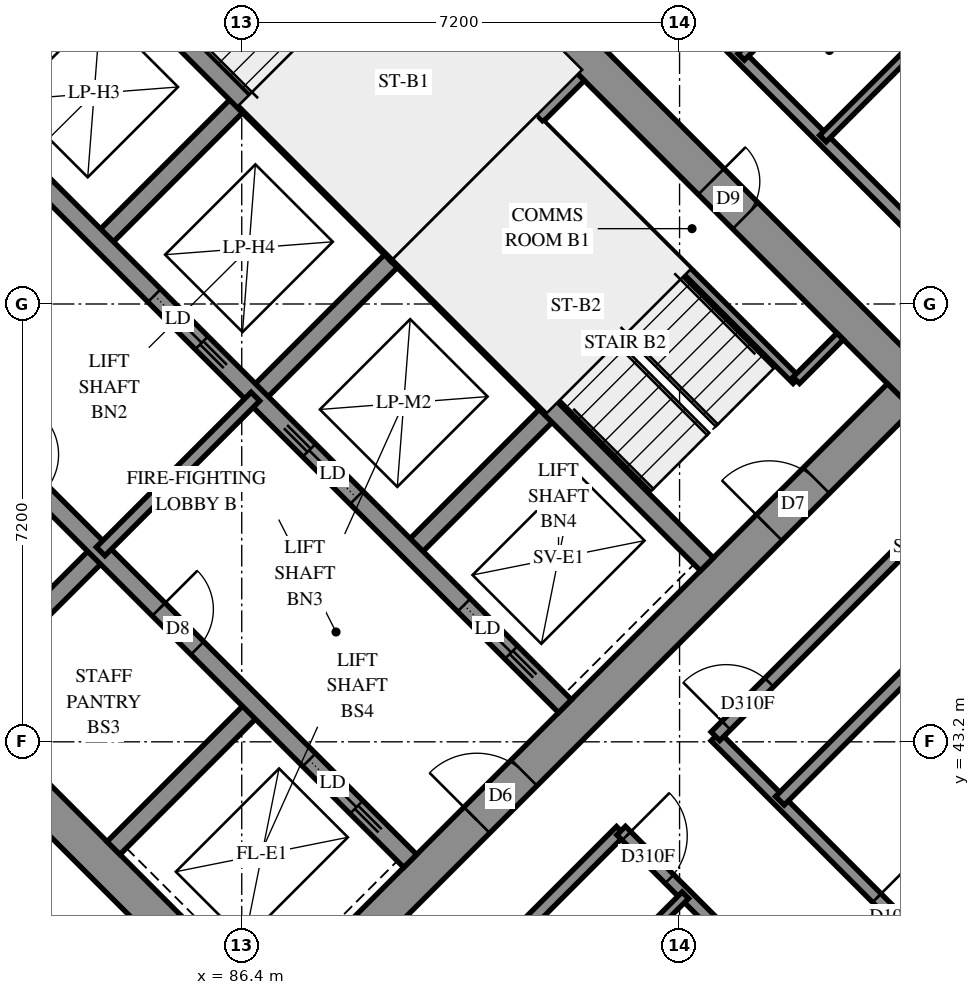
"""IFC4 building model, lengths in metres.
Left out: names, types, materials, properties, quantities, classifications, styles, units other than length and angle.
Written with IfcOpenShell. Run it as: python <this file> out.ifc"""

import sys

from ifc_helpers import new_model, si_unit, direction, frame, frame_2d, origin, place, context, subcontext, project, spatial, polyline, rectangle, outline, extrude, element, fill, save


model = new_model("IFC4")
c1 = context("Model", 3, precision=1e-05, world=origin(), true_north=direction((0.0, 1.0)))
c2 = subcontext(c1, "Body", "Model", "MODEL_VIEW")
j1 = project(units=[si_unit("LENGTHUNIT", "METRE"), si_unit("PLANEANGLEUNIT", "RADIAN")], contexts=[c1])
p1 = place(None, origin())
s1 = spatial("IfcSite", under=j1, at=p1, CompositionType="ELEMENT")
p2 = place(p1, origin())
s2 = spatial("IfcBuilding", under=s1, at=p2, CompositionType="ELEMENT")
p3 = place(p2, frame((0.0, 0.0, 145.6)))
s3 = spatial("IfcBuildingStorey", under=s2, at=p3, CompositionType="ELEMENT", Elevation=145.6)
p4 = place(p3, frame((76.018, 49.302, -0.3), z_axis=(0.0, 0.0, 1.0), x_axis=(0.7071067812, -0.7071067812, 0.0)))
e1 = element("IfcWall", 1, at=p4, inside=s3, PredefinedType="SHEAR", context=c2, shape_type="SweptSolid", body=[
    extrude(rectangle(XDim=15.6, YDim=0.6, at=frame_2d((7.8, 0.0))), origin(), (0.0, 0.0, 1.0), 2.7),
])
p5 = place(p3, frame((86.625, 59.908, -0.3), z_axis=(0.0, 0.0, 1.0), x_axis=(0.7071067812, -0.7071067812, 0.0)))
e2 = element("IfcWall", 2, at=p5, inside=s3, PredefinedType="SHEAR", context=c2, shape_type="SweptSolid", body=[
    extrude(rectangle(XDim=15.6, YDim=0.6, at=frame_2d((7.8, 0.0))), origin(), (0.0, 0.0, 1.0), 2.7),
])
p6 = place(p5, frame((10.6, 0.0, 0.3)))
e3 = element("IfcOpeningElement", 3, at=p6, cuts=e2, PredefinedType="OPENING", context=c2, shape_type="SweptSolid", body=[
    extrude(rectangle(XDim=0.8, YDim=2.1, at=frame_2d((0.4, 1.05))), frame((0.0, 0.31, 0.0), z_axis=(0.0, -1.0, 0.0), x_axis=(1.0, 0.0, 0.0)), (0.0, 0.0, 1.0), 0.62),
])
p7 = place(p3, frame((76.442, 49.302, -0.3), z_axis=(0.0, 0.0, 1.0), x_axis=(0.7071067812, 0.7071067812, 0.0)))
e4 = element("IfcWall", 4, at=p7, inside=s3, PredefinedType="SHEAR", context=c2, shape_type="SweptSolid", body=[
    extrude(rectangle(XDim=14.4, YDim=0.6, at=frame_2d((7.2, 0.0))), origin(), (0.0, 0.0, 1.0), 2.7),
])
p8 = place(p7, frame((4.55, 0.0, 0.3)))
e5 = element("IfcOpeningElement", 5, at=p8, cuts=e4, PredefinedType="OPENING", context=c2, shape_type="SweptSolid", body=[
    extrude(rectangle(XDim=1.1, YDim=2.1, at=frame_2d((0.55, 1.05))), frame((0.0, 0.31, 0.0), z_axis=(0.0, -1.0, 0.0), x_axis=(1.0, 0.0, 0.0)), (0.0, 0.0, 1.0), 0.62),
])
p9 = place(p7, frame((11.35, 0.0, 0.3)))
e6 = element("IfcOpeningElement", 6, at=p9, cuts=e4, PredefinedType="OPENING", context=c2, shape_type="SweptSolid", body=[
    extrude(rectangle(XDim=1.1, YDim=2.1, at=frame_2d((0.55, 1.05))), frame((0.0, 0.31, 0.0), z_axis=(0.0, -1.0, 0.0), x_axis=(1.0, 0.0, 0.0)), (0.0, 0.0, 1.0), 0.62),
])
p10 = place(p3, frame((87.049, 38.695, -0.3), z_axis=(0.0, 0.0, 1.0), x_axis=(0.7071067812, 0.7071067812, 0.0)))
e7 = element("IfcWall", 7, at=p10, inside=s3, PredefinedType="SHEAR", context=c2, shape_type="SweptSolid", body=[
    extrude(rectangle(XDim=14.4, YDim=0.6, at=frame_2d((7.2, 0.0))), origin(), (0.0, 0.0, 1.0), 2.7),
])
p11 = place(p10, frame((4.55, 0.0, 0.3)))
e8 = element("IfcOpeningElement", 8, at=p11, cuts=e7, PredefinedType="OPENING", context=c2, shape_type="SweptSolid", body=[
    extrude(rectangle(XDim=1.1, YDim=2.1, at=frame_2d((0.55, 1.05))), frame((0.0, 0.31, 0.0), z_axis=(0.0, -1.0, 0.0), x_axis=(1.0, 0.0, 0.0)), (0.0, 0.0, 1.0), 0.62),
])
p12 = place(p10, frame((11.35, 0.0, 0.3)))
e9 = element("IfcOpeningElement", 9, at=p12, cuts=e7, PredefinedType="OPENING", context=c2, shape_type="SweptSolid", body=[
    extrude(rectangle(XDim=1.1, YDim=2.1, at=frame_2d((0.55, 1.05))), frame((0.0, 0.31, 0.0), z_axis=(0.0, -1.0, 0.0), x_axis=(1.0, 0.0, 0.0)), (0.0, 0.0, 1.0), 0.62),
])
p13 = place(p3, frame((84.079, 51.423, 0.0), z_axis=(0.0, 0.0, 1.0), x_axis=(0.7071219326, 0.7070916295, 0.0)))
e10 = element("IfcWall", 10, at=p13, inside=s3, PredefinedType="SOLIDWALL", context=c2, shape_type="SweptSolid", body=[
    extrude(rectangle(XDim=3.3, YDim=0.3, at=frame_2d((1.65, 0.0))), origin(), (0.0, 0.0, 1.0), 3.1),
])
p14 = place(p3, frame((81.746, 43.999, 0.0), z_axis=(0.0, 0.0, 1.0), x_axis=(0.7071067812, 0.7071067812, 0.0)))
e11 = element("IfcWall", 11, at=p14, inside=s3, PredefinedType="SOLIDWALL", context=c2, shape_type="SweptSolid", body=[
    extrude(rectangle(XDim=3.3, YDim=0.3, at=frame_2d((1.65, 0.0))), origin(), (0.0, 0.0, 1.0), 3.1),
])
p15 = place(p3, frame((86.625, 48.878, 0.0), z_axis=(0.0, 0.0, 1.0), x_axis=(0.7071067812, 0.7071067812, 0.0)))
e12 = element("IfcWall", 12, at=p15, inside=s3, PredefinedType="SOLIDWALL", context=c2, shape_type="SweptSolid", body=[
    extrude(rectangle(XDim=3.3, YDim=0.3, at=frame_2d((1.65, 0.0))), origin(), (0.0, 0.0, 1.0), 3.1),
])
p16 = place(p3, frame((84.291, 41.453, 0.0), z_axis=(0.0, 0.0, 1.0), x_axis=(0.7071067812, 0.7071067812, 0.0)))
e13 = element("IfcWall", 13, at=p16, inside=s3, PredefinedType="SOLIDWALL", context=c2, shape_type="SweptSolid", body=[
    extrude(rectangle(XDim=3.3, YDim=0.3, at=frame_2d((1.65, 0.0))), origin(), (0.0, 0.0, 1.0), 3.1),
])
p17 = place(p3, frame((89.17, 46.332, 0.0), z_axis=(0.0, 0.0, 1.0), x_axis=(0.7071067812, 0.7071067812, 0.0)))
e14 = element("IfcWall", 14, at=p17, inside=s3, PredefinedType="SOLIDWALL", context=c2, shape_type="SweptSolid", body=[
    extrude(rectangle(XDim=3.3, YDim=0.3, at=frame_2d((1.65, 0.0))), origin(), (0.0, 0.0, 1.0), 3.1),
])
p18 = place(p3, frame((78.988, 51.423, 0.0), z_axis=(0.0, 0.0, 1.0), x_axis=(0.7071067812, -0.7071067812, 0.0)))
e15 = element("IfcWall", 15, at=p18, inside=s3, PredefinedType="SOLIDWALL", context=c2, shape_type="SweptSolid", body=[
    extrude(rectangle(XDim=14.4, YDim=0.3, at=frame_2d((7.2, 0.0))), origin(), (0.0, 0.0, 1.0), 3.1),
])
p19 = place(p18, frame((1.35, 0.0, 0.0)))
e16 = element("IfcOpeningElement", 16, at=p19, cuts=e15, PredefinedType="OPENING", context=c2, shape_type="SweptSolid", body=[
    extrude(rectangle(XDim=0.9, YDim=2.1, at=frame_2d((0.45, 1.05))), frame((0.0, 0.16, 0.0), z_axis=(0.0, -1.0, 0.0), x_axis=(1.0, 0.0, 0.0)), (0.0, 0.0, 1.0), 0.32),
])
p20 = place(p18, frame((4.95, 0.0, 0.0)))
e17 = element("IfcOpeningElement", 17, at=p20, cuts=e15, PredefinedType="OPENING", context=c2, shape_type="SweptSolid", body=[
    extrude(rectangle(XDim=0.9, YDim=2.1, at=frame_2d((0.45, 1.05))), frame((0.0, 0.16, 0.0), z_axis=(0.0, -1.0, 0.0), x_axis=(1.0, 0.0, 0.0)), (0.0, 0.0, 1.0), 0.32),
])
p21 = place(p18, frame((8.55, 0.0, 0.0)))
e18 = element("IfcOpeningElement", 18, at=p21, cuts=e15, PredefinedType="OPENING", context=c2, shape_type="SweptSolid", body=[
    extrude(rectangle(XDim=0.9, YDim=2.1, at=frame_2d((0.45, 1.05))), frame((0.0, 0.16, 0.0), z_axis=(0.0, -1.0, 0.0), x_axis=(1.0, 0.0, 0.0)), (0.0, 0.0, 1.0), 0.32),
])
p22 = place(p18, frame((12.05, 0.0, 0.0)))
e19 = element("IfcOpeningElement", 19, at=p22, cuts=e15, PredefinedType="OPENING", context=c2, shape_type="SweptSolid", body=[
    extrude(rectangle(XDim=1.1, YDim=2.1, at=frame_2d((0.55, 1.05))), frame((0.0, 0.16, 0.0), z_axis=(0.0, -1.0, 0.0), x_axis=(1.0, 0.0, 0.0)), (0.0, 0.0, 1.0), 0.32),
])
p23 = place(p3, frame((81.534, 53.969, 0.0), z_axis=(0.0, 0.0, 1.0), x_axis=(0.707103309, -0.7071102534, 0.0)))
e20 = element("IfcWall", 20, at=p23, inside=s3, PredefinedType="SOLIDWALL", context=c2, shape_type="SweptSolid", body=[
    extrude(rectangle(XDim=14.4, YDim=0.3, at=frame_2d((7.2, 0.0))), origin(), (0.0, 0.0, 1.0), 3.1),
])
p24 = place(p23, frame((1.25, 0.0, 0.0)))
e21 = element("IfcOpeningElement", 21, at=p24, cuts=e20, PredefinedType="OPENING", context=c2, shape_type="SweptSolid", body=[
    extrude(rectangle(XDim=1.1, YDim=2.1, at=frame_2d((0.55, 1.05))), frame((0.0, 0.16, 0.0), z_axis=(0.0, -1.0, 0.0), x_axis=(1.0, 0.0, 0.0)), (0.0, 0.0, 1.0), 0.32),
])
p25 = place(p23, frame((4.85, 0.0, 0.0)))
e22 = element("IfcOpeningElement", 22, at=p25, cuts=e20, PredefinedType="OPENING", context=c2, shape_type="SweptSolid", body=[
    extrude(rectangle(XDim=1.1, YDim=2.1, at=frame_2d((0.55, 1.05))), frame((0.0, 0.16, 0.0), z_axis=(0.0, -1.0, 0.0), x_axis=(1.0, 0.0, 0.0)), (0.0, 0.0, 1.0), 0.32),
])
p26 = place(p23, frame((8.45, 0.0, 0.0)))
e23 = element("IfcOpeningElement", 23, at=p26, cuts=e20, PredefinedType="OPENING", context=c2, shape_type="SweptSolid", body=[
    extrude(rectangle(XDim=1.1, YDim=2.1, at=frame_2d((0.55, 1.05))), frame((0.0, 0.16, 0.0), z_axis=(0.0, -1.0, 0.0), x_axis=(1.0, 0.0, 0.0)), (0.0, 0.0, 1.0), 0.32),
])
p27 = place(p23, frame((12.05, 0.0, 0.0)))
e24 = element("IfcOpeningElement", 24, at=p27, cuts=e20, PredefinedType="OPENING", context=c2, shape_type="SweptSolid", body=[
    extrude(rectangle(XDim=1.1, YDim=2.1, at=frame_2d((0.55, 1.05))), frame((0.0, 0.16, 0.0), z_axis=(0.0, -1.0, 0.0), x_axis=(1.0, 0.0, 0.0)), (0.0, 0.0, 1.0), 0.32),
])
for number, where, z_axis, x_axis in (
    (25, (83.867, 56.302, 0.0), (0.0, 0.0, 1.0), (0.707, -0.707, 0.0)),
    (26, (88.958, 51.211, 0.0), (0.0, 0.0, 1.0), (0.707, -0.707, 0.0)),
):
    element("IfcWall", number, at=place(p3, frame(where, z_axis=z_axis, x_axis=x_axis)), inside=s3, PredefinedType="SOLIDWALL", context=c2, shape_type="SweptSolid", body=[
        extrude(rectangle(XDim=7.2, YDim=0.3, at=frame_2d((3.6, 0.0))), origin(), (0.0, 0.0, 1.0), 3.1),
    ])
p28 = place(p3, frame((88.958, 51.211, 0.0), z_axis=(0.0, 0.0, 1.0), x_axis=(0.7071067812, 0.7071067812, 0.0)))
e27 = element("IfcWall", 27, at=p28, inside=s3, PredefinedType="SOLIDWALL", context=c2, shape_type="SweptSolid", body=[
    extrude(rectangle(XDim=4.2, YDim=0.3, at=frame_2d((2.1, 0.0))), origin(), (0.0, 0.0, 1.0), 3.1),
])
p29 = place(p3, frame((98.601, 54.493, 0.0), z_axis=(0.0, 0.0, 1.0), x_axis=(-0.7837629032, 0.6210601514, 0.0)))
e28 = element("IfcWall", 28, at=p29, inside=s3, PredefinedType="SOLIDWALL", context=c2, shape_type="SweptSolid", body=[
    extrude(outline(polyline([(-0.029, -0.25), (3.369, -0.25), (3.427, 0.25), (0.029, 0.25), (-0.029, -0.25)])), origin(), (0.0, 0.0, 1.0), 3.1),
])
p30 = place(p29, frame((1.401, 0.0, 0.45)))
e29 = element("IfcOpeningElement", 29, at=p30, cuts=e28, PredefinedType="OPENING", context=c2, shape_type="SweptSolid", body=[
    extrude(rectangle(XDim=1.2, YDim=2.5, at=frame_2d((0.6, 1.25))), frame((0.0, 0.26, 0.0), z_axis=(0.0, -1.0, 0.0), x_axis=(1.0, 0.0, 0.0)), (0.0, 0.0, 1.0), 0.52),
])
p31 = place(p3, frame((91.313, 53.354, 0.0), z_axis=(0.0, 0.0, 1.0), x_axis=(0.7071067812, -0.7071067812, 0.0)))
e30 = element("IfcWall", 30, at=p31, inside=s3, PredefinedType="PARTITIONING", context=c2, shape_type="SweptSolid", body=[
    extrude(rectangle(XDim=5.95, YDim=0.15, at=frame_2d((2.975, 0.0))), origin(), (0.0, 0.0, 1.0), 3.1),
])
p32 = place(p3, frame((95.52, 49.146, 0.0), z_axis=(0.0, 0.0, 1.0), x_axis=(0.7071067812, 0.7071067812, 0.0)))
e31 = element("IfcWall", 31, at=p32, inside=s3, PredefinedType="PARTITIONING", context=c2, shape_type="SweptSolid", body=[
    extrude(rectangle(XDim=1.02, YDim=0.15, at=frame_2d((0.51, 0.0))), origin(), (0.0, 0.0, 1.0), 3.1),
])
p33 = place(p3, frame((84.079, 46.332, 0.0), z_axis=(0.0, 0.0, 1.0), x_axis=(0.7071067812, 0.7071067812, 0.0)))
e32 = element("IfcWall", 32, at=p33, inside=s3, PredefinedType="PARTITIONING", context=c2, shape_type="SweptSolid", body=[
    extrude(rectangle(XDim=3.6, YDim=0.2, at=frame_2d((1.8, 0.0))), origin(), (0.0, 0.0, 1.0), 3.1),
])
p34 = place(p3, frame((94.189, 43.287, 0.0), z_axis=(0.0, 0.0, 1.0), x_axis=(0.7071067812, -0.7071067812, 0.0)))
e33 = element("IfcWall", 33, at=p34, inside=s3, PredefinedType="PARTITIONING", context=c2, shape_type="SweptSolid", body=[
    extrude(rectangle(XDim=12.298, YDim=0.2, at=frame_2d((6.149, 0.0))), origin(), (0.0, 0.0, 1.0), 3.1),
])
p35 = place(p34, frame((3.755, 0.0, 0.0)))
e34 = element("IfcOpeningElement", 34, at=p35, cuts=e33, PredefinedType="OPENING", context=c2, shape_type="SweptSolid", body=[
    extrude(rectangle(XDim=0.9, YDim=2.1, at=frame_2d((0.45, 1.05))), frame((0.0, 0.11, 0.0), z_axis=(0.0, -1.0, 0.0), x_axis=(1.0, 0.0, 0.0)), (0.0, 0.0, 1.0), 0.22),
])
p36 = place(p34, frame((10.998, 0.0, 0.0)))
e35 = element("IfcOpeningElement", 35, at=p36, cuts=e33, PredefinedType="OPENING", context=c2, shape_type="SweptSolid", body=[
    extrude(rectangle(XDim=0.9, YDim=2.1, at=frame_2d((0.45, 1.05))), frame((0.0, 0.11, 0.0), z_axis=(0.0, -1.0, 0.0), x_axis=(1.0, 0.0, 0.0)), (0.0, 0.0, 1.0), 0.22),
])
p37 = place(p3, frame((91.755, 57.317, 0.0), z_axis=(0.0, 0.0, 1.0), x_axis=(0.7071067812, -0.7071067812, 0.0)))
e36 = element("IfcWall", 36, at=p37, inside=s3, PredefinedType="PARTITIONING", context=c2, shape_type="SweptSolid", body=[
    extrude(rectangle(XDim=11.639, YDim=0.2, at=frame_2d((5.819, 0.0))), origin(), (0.0, 0.0, 1.0), 3.1),
])
p38 = place(p3, frame((95.25, 42.232, 0.0), z_axis=(0.0, 0.0, 1.0), x_axis=(0.7071114386, 0.7071021238, 0.0)))
e37 = element("IfcWall", 37, at=p38, inside=s3, PredefinedType="PARTITIONING", context=c2, shape_type="SweptSolid", body=[
    extrude(rectangle(XDim=10.736, YDim=0.2, at=frame_2d((5.368, 0.0))), origin(), (0.0, 0.0, 1.0), 3.1),
])
p39 = place(p3, frame((80.899, 41.869, 0.0), z_axis=(0.0, 0.0, 1.0), x_axis=(0.7071067812, -0.7071067812, 0.0)))
e38 = element("IfcWall", 38, at=p39, inside=s3, PredefinedType="PARTITIONING", context=c2, shape_type="SweptSolid", body=[
    extrude(rectangle(XDim=8.392, YDim=0.2, at=frame_2d((4.196, 0.0))), origin(), (0.0, 0.0, 1.0), 3.1),
])
p40 = place(p39, frame((4.988, 0.0, 0.0)))
e39 = element("IfcOpeningElement", 39, at=p40, cuts=e38, PredefinedType="OPENING", context=c2, shape_type="SweptSolid", body=[
    extrude(rectangle(XDim=0.9, YDim=2.1, at=frame_2d((0.45, 1.05))), frame((0.0, 0.11, 0.0), z_axis=(0.0, -1.0, 0.0), x_axis=(1.0, 0.0, 0.0)), (0.0, 0.0, 1.0), 0.22),
])
p41 = place(p3, frame((94.19, 43.292, 0.0), z_axis=(0.0, 0.0, 1.0), x_axis=(0.7071067812, 0.7071067812, 0.0)))
e40 = element("IfcWall", 40, at=p41, inside=s3, PredefinedType="PARTITIONING", context=c2, shape_type="SweptSolid", body=[
    extrude(rectangle(XDim=8.2, YDim=0.2, at=frame_2d((4.1, 0.0))), origin(), (0.0, 0.0, 1.0), 3.1),
])
p42 = place(p41, frame((0.251, 0.0, 0.0)))
e41 = element("IfcOpeningElement", 41, at=p42, cuts=e40, PredefinedType="OPENING", context=c2, shape_type="SweptSolid", body=[
    extrude(rectangle(XDim=1.0, YDim=2.1, at=frame_2d((0.5, 1.05))), frame((0.0, 0.11, 0.0), z_axis=(0.0, -1.0, 0.0), x_axis=(1.0, 0.0, 0.0)), (0.0, 0.0, 1.0), 0.22),
])
p43 = place(p3, frame((86.836, 35.938, 0.0), z_axis=(0.0, 0.0, 1.0), x_axis=(0.7071067812, 0.7071067812, 0.0)))
e42 = element("IfcWall", 42, at=p43, inside=s3, PredefinedType="PARTITIONING", context=c2, shape_type="SweptSolid", body=[
    extrude(rectangle(XDim=8.2, YDim=0.2, at=frame_2d((4.1, 0.0))), origin(), (0.0, 0.0, 1.0), 3.1),
])
p44 = place(p3, frame((92.639, 41.739, 0.0), z_axis=(0.0, 0.0, 1.0), x_axis=(0.7071067812, -0.7071067812, 0.0)))
e43 = element("IfcWall", 43, at=p44, inside=s3, PredefinedType="PARTITIONING", context=c2, shape_type="SweptSolid", body=[
    extrude(rectangle(XDim=5.1, YDim=0.2, at=frame_2d((2.55, 0.0))), origin(), (0.0, 0.0, 1.0), 3.1),
])
p45 = place(p44, frame((0.123, 0.0, 0.0)))
e44 = element("IfcOpeningElement", 44, at=p45, cuts=e43, PredefinedType="OPENING", context=c2, shape_type="SweptSolid", body=[
    extrude(rectangle(XDim=1.0, YDim=2.1, at=frame_2d((0.5, 1.05))), frame((0.0, 0.11, 0.0), z_axis=(0.0, -1.0, 0.0), x_axis=(1.0, 0.0, 0.0)), (0.0, 0.0, 1.0), 0.22),
])
p46 = place(p44, frame((3.734, 0.0, 0.0)))
e45 = element("IfcOpeningElement", 45, at=p46, cuts=e43, PredefinedType="OPENING", context=c2, shape_type="SweptSolid", body=[
    extrude(rectangle(XDim=0.9, YDim=2.1, at=frame_2d((0.45, 1.05))), frame((0.0, 0.11, 0.0), z_axis=(0.0, -1.0, 0.0), x_axis=(1.0, 0.0, 0.0)), (0.0, 0.0, 1.0), 0.22),
])
p47 = place(p3, frame((95.957, 53.121, 0.0), z_axis=(0.0, 0.0, 1.0), x_axis=(0.7071067812, 0.7071067812, 0.0)))
e46 = element("IfcWall", 46, at=p47, inside=s3, PredefinedType="PARTITIONING", context=c2, shape_type="SweptSolid", body=[
    extrude(rectangle(XDim=2.484, YDim=0.15, at=frame_2d((1.242, 0.0))), origin(), (0.0, 0.0, 1.0), 3.1),
])
p48 = place(p3, frame((91.997, 38.979, 0.0), z_axis=(0.0, 0.0, 1.0), x_axis=(0.7071067812, 0.7071067812, 0.0)))
e47 = element("IfcWall", 47, at=p48, inside=s3, PredefinedType="PARTITIONING", context=c2, shape_type="SweptSolid", body=[
    extrude(rectangle(XDim=2.401, YDim=0.15, at=frame_2d((1.201, 0.0))), origin(), (0.0, 0.0, 1.0), 3.1),
])
p49 = place(p3, frame((94.614, 54.464, 0.0), z_axis=(0.0, 0.0, 1.0), x_axis=(0.7070846955, 0.7071288662, 0.0)))
e48 = element("IfcWall", 48, at=p49, inside=s3, PredefinedType="PARTITIONING", context=c2, shape_type="SweptSolid", body=[
    extrude(rectangle(XDim=2.264, YDim=0.15, at=frame_2d((1.132, 0.0))), origin(), (0.0, 0.0, 1.0), 3.1),
])
p50 = place(p49, frame((0.466, 0.0, 0.0)))
e49 = element("IfcOpeningElement", 49, at=p50, cuts=e48, PredefinedType="OPENING", context=c2, shape_type="SweptSolid", body=[
    extrude(rectangle(XDim=0.8, YDim=2.1, at=frame_2d((0.4, 1.05))), frame((0.0, 0.085, 0.0), z_axis=(0.0, -1.0, 0.0), x_axis=(1.0, 0.0, 0.0)), (0.0, 0.0, 1.0), 0.17),
])
p51 = place(p6, origin())
e50 = element("IfcDoor", 50, at=p51, inside=s3, OperationType="SINGLE_SWING_RIGHT", PredefinedType="DOOR", context=c2, shape_type="SweptSolid", body=[
    extrude(rectangle(XDim=0.8, YDim=2.1, at=frame_2d((0.4, 1.05))), frame((0.0, 0.025, 0.0), z_axis=(0.0, -1.0, 0.0), x_axis=(1.0, 0.0, 0.0)), (0.0, 0.0, 1.0), 0.05),
])
fill(e3, e50)
p52 = place(p11, origin())
e51 = element("IfcDoor", 51, at=p52, inside=s3, OperationType="DOUBLE_DOOR_SINGLE_SWING", PredefinedType="DOOR", context=c2, shape_type="SweptSolid", body=[
    extrude(rectangle(XDim=1.1, YDim=2.1, at=frame_2d((0.55, 1.05))), frame((0.0, 0.025, 0.0), z_axis=(0.0, -1.0, 0.0), x_axis=(1.0, 0.0, 0.0)), (0.0, 0.0, 1.0), 0.05),
])
fill(e8, e51)
p53 = place(p12, origin())
e52 = element("IfcDoor", 52, at=p53, inside=s3, OperationType="SINGLE_SWING_RIGHT", PredefinedType="DOOR", context=c2, shape_type="SweptSolid", body=[
    extrude(rectangle(XDim=1.1, YDim=2.1, at=frame_2d((0.55, 1.05))), frame((0.0, 0.025, 0.0), z_axis=(0.0, -1.0, 0.0), x_axis=(1.0, 0.0, 0.0)), (0.0, 0.0, 1.0), 0.05),
])
fill(e9, e52)
p54 = place(p21, origin())
e53 = element("IfcDoor", 53, at=p54, inside=s3, OperationType="SINGLE_SWING_LEFT", PredefinedType="DOOR", context=c2, shape_type="SweptSolid", body=[
    extrude(rectangle(XDim=0.9, YDim=2.1, at=frame_2d((0.45, 1.05))), frame((0.0, 0.025, 0.0), z_axis=(0.0, -1.0, 0.0), x_axis=(1.0, 0.0, 0.0)), (0.0, 0.0, 1.0), 0.05),
])
fill(e18, e53)
p55 = place(p22, origin())
e54 = element("IfcDoor", 54, at=p55, inside=s3, OperationType="SLIDING_TO_RIGHT", PredefinedType="DOOR", context=c2, shape_type="SweptSolid", body=[
    extrude(rectangle(XDim=1.1, YDim=2.1, at=frame_2d((0.55, 1.05))), frame((0.0, 0.025, 0.0), z_axis=(0.0, -1.0, 0.0), x_axis=(1.0, 0.0, 0.0)), (0.0, 0.0, 1.0), 0.05),
])
fill(e19, e54)
p56 = place(p25, origin())
e55 = element("IfcDoor", 55, at=p56, inside=s3, OperationType="SLIDING_TO_RIGHT", PredefinedType="DOOR", context=c2, shape_type="SweptSolid", body=[
    extrude(rectangle(XDim=1.1, YDim=2.1, at=frame_2d((0.55, 1.05))), frame((0.0, 0.025, 0.0), z_axis=(0.0, -1.0, 0.0), x_axis=(1.0, 0.0, 0.0)), (0.0, 0.0, 1.0), 0.05),
])
fill(e22, e55)
p57 = place(p26, origin())
e56 = element("IfcDoor", 56, at=p57, inside=s3, OperationType="SLIDING_TO_LEFT", PredefinedType="DOOR", context=c2, shape_type="SweptSolid", body=[
    extrude(rectangle(XDim=1.1, YDim=2.1, at=frame_2d((0.55, 1.05))), frame((0.0, 0.025, 0.0), z_axis=(0.0, -1.0, 0.0), x_axis=(1.0, 0.0, 0.0)), (0.0, 0.0, 1.0), 0.05),
])
fill(e23, e56)
p58 = place(p27, origin())
e57 = element("IfcDoor", 57, at=p58, inside=s3, OperationType="SLIDING_TO_RIGHT", PredefinedType="DOOR", context=c2, shape_type="SweptSolid", body=[
    extrude(rectangle(XDim=1.1, YDim=2.1, at=frame_2d((0.55, 1.05))), frame((0.0, 0.025, 0.0), z_axis=(0.0, -1.0, 0.0), x_axis=(1.0, 0.0, 0.0)), (0.0, 0.0, 1.0), 0.05),
])
fill(e24, e57)
p59 = place(p42, origin())
e58 = element("IfcDoor", 58, at=p59, inside=s3, OperationType="SINGLE_SWING_RIGHT", PredefinedType="DOOR", context=c2, shape_type="SweptSolid", body=[
    extrude(rectangle(XDim=1.0, YDim=2.1, at=frame_2d((0.5, 1.05))), frame((0.0, 0.025, 0.0), z_axis=(0.0, -1.0, 0.0), x_axis=(1.0, 0.0, 0.0)), (0.0, 0.0, 1.0), 0.05),
])
fill(e41, e58)
p60 = place(p35, origin())
e59 = element("IfcDoor", 59, at=p60, inside=s3, OperationType="SINGLE_SWING_RIGHT", PredefinedType="DOOR", context=c2, shape_type="SweptSolid", body=[
    extrude(rectangle(XDim=0.9, YDim=2.1, at=frame_2d((0.45, 1.05))), frame((0.0, 0.025, 0.0), z_axis=(0.0, -1.0, 0.0), x_axis=(1.0, 0.0, 0.0)), (0.0, 0.0, 1.0), 0.05),
])
fill(e34, e59)
p61 = place(p45, origin())
e60 = element("IfcDoor", 60, at=p61, inside=s3, OperationType="SINGLE_SWING_RIGHT", PredefinedType="DOOR", context=c2, shape_type="SweptSolid", body=[
    extrude(rectangle(XDim=1.0, YDim=2.1, at=frame_2d((0.5, 1.05))), frame((0.0, 0.025, 0.0), z_axis=(0.0, -1.0, 0.0), x_axis=(1.0, 0.0, 0.0)), (0.0, 0.0, 1.0), 0.05),
])
fill(e44, e60)
save(model, sys.argv[1])
